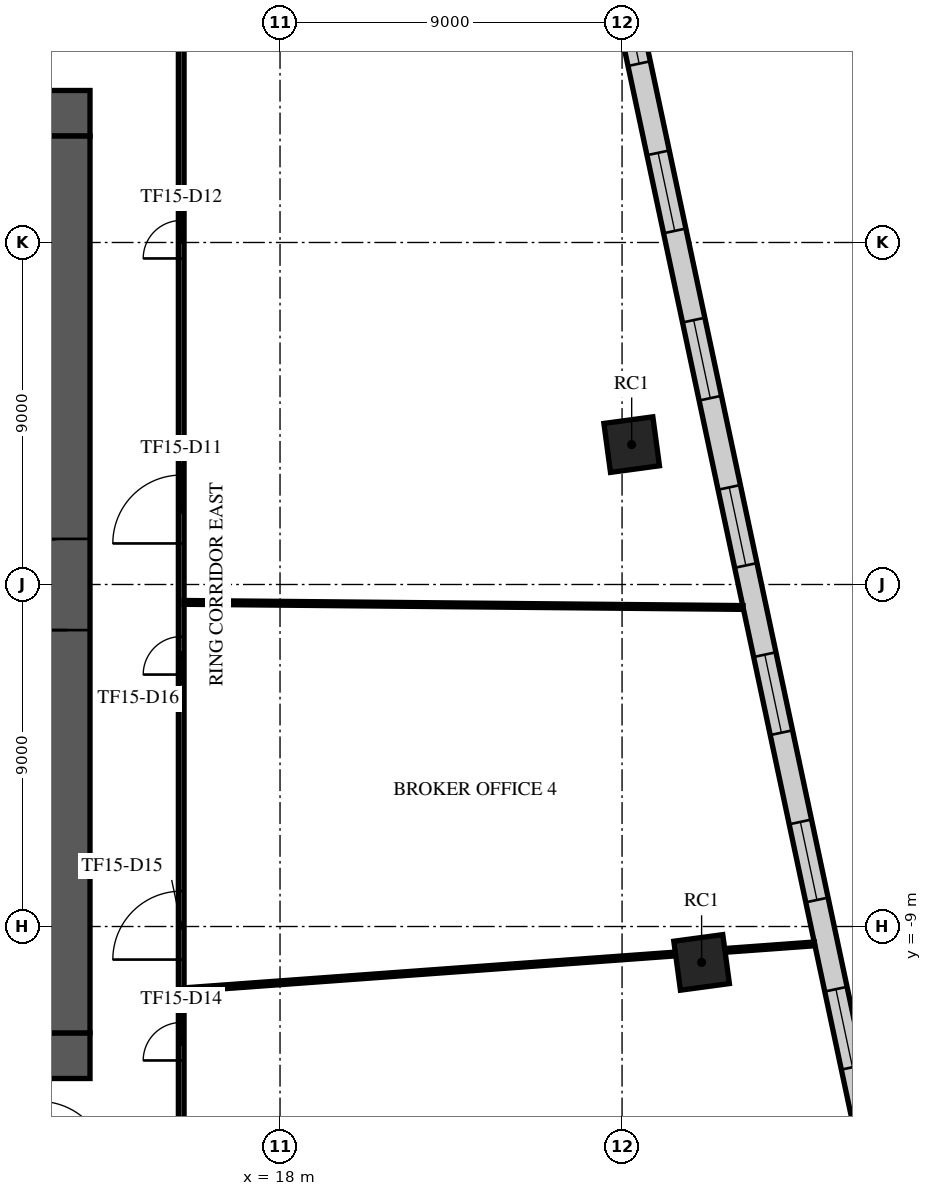
"""IFC4 building model, lengths in metres.
Left out: names, types, materials, properties, quantities, classifications, styles, units other than length and angle.
Written with IfcOpenShell. Run it as: python <this file> out.ifc"""

import sys

from ifc_helpers import new_model, si_unit, direction, frame, frame_2d, origin, origin_2d, place, context, subcontext, project, spatial, rectangle, extrude, element, fill, save


model = new_model("IFC4")
c1 = context("Model", 3, precision=1e-05, world=origin(), true_north=direction((0.0, 1.0)))
c2 = subcontext(c1, "Body", "Model", "MODEL_VIEW")
j1 = project(units=[si_unit("LENGTHUNIT", "METRE"), si_unit("PLANEANGLEUNIT", "RADIAN")], contexts=[c1])
p1 = place(None, origin())
s1 = spatial("IfcSite", under=j1, at=p1, CompositionType="ELEMENT")
p2 = place(p1, origin())
s2 = spatial("IfcBuilding", under=s1, at=p2, CompositionType="ELEMENT")
p3 = place(p2, frame((0.0, 0.0, 68.1)))
s3 = spatial("IfcBuildingStorey", under=s2, at=p3, CompositionType="ELEMENT", Elevation=68.1)
for number, where, z_axis, x_axis in (
    (1, (29.093, -9.945, 0.0), (0.0, 0.0, 1.0), (0.991, 0.134, 0.0)),
    (2, (27.253, 3.681, 0.0), (0.0, 0.0, 1.0), (0.991, 0.134, 0.0)),
):
    element("IfcColumn", number, at=place(p3, frame(where, z_axis=z_axis, x_axis=x_axis)), inside=s3, PredefinedType="COLUMN", context=c2, shape_type="SweptSolid", body=[
        extrude(rectangle(XDim=1.3, YDim=1.3, at=origin_2d()), origin(), (0.0, 0.0, 1.0), 4.2),
    ])
p4 = place(p3, frame((-13.0, 12.4, 0.0), z_axis=(0.0, 0.0, 1.0), x_axis=(1.0, 0.0, 0.0)))
e3 = element("IfcWall", 3, at=p4, inside=s3, PredefinedType="SHEAR", context=c2, shape_type="SweptSolid", body=[
    extrude(rectangle(XDim=26.0, YDim=1.2, at=frame_2d((13.0, 0.0))), origin(), (0.0, 0.0, 1.0), 3.75),
])
p5 = place(p4, frame((11.8, 0.0, 0.0)))
e4 = element("IfcOpeningElement", 4, at=p5, cuts=e3, PredefinedType="OPENING", context=c2, shape_type="SweptSolid", body=[
    extrude(rectangle(XDim=2.4, YDim=2.4, at=frame_2d((1.2, 1.2))), frame((0.0, 0.61, 0.0), z_axis=(0.0, -1.0, 0.0), x_axis=(1.0, 0.0, 0.0)), (0.0, 0.0, 1.0), 1.22),
])
p6 = place(p4, frame((22.625, 0.0, 0.0)))
e5 = element("IfcOpeningElement", 5, at=p6, cuts=e3, PredefinedType="OPENING", context=c2, shape_type="SweptSolid", body=[
    extrude(rectangle(XDim=1.2, YDim=2.1, at=frame_2d((0.6, 1.05))), frame((0.0, 0.61, 0.0), z_axis=(0.0, -1.0, 0.0), x_axis=(1.0, 0.0, 0.0)), (0.0, 0.0, 1.0), 1.22),
])
p7 = place(p4, frame((1.6, 0.0, 0.0)))
e6 = element("IfcOpeningElement", 6, at=p7, cuts=e3, PredefinedType="OPENING", context=c2, shape_type="SweptSolid", body=[
    extrude(rectangle(XDim=1.0, YDim=2.1, at=frame_2d((0.5, 1.05))), frame((0.0, 0.61, 0.0), z_axis=(0.0, -1.0, 0.0), x_axis=(1.0, 0.0, 0.0)), (0.0, 0.0, 1.0), 1.22),
])
p8 = place(p3, frame((-13.0, -12.4, 0.0), z_axis=(0.0, 0.0, 1.0), x_axis=(1.0, 0.0, 0.0)))
e7 = element("IfcWall", 7, at=p8, inside=s3, PredefinedType="SHEAR", context=c2, shape_type="SweptSolid", body=[
    extrude(rectangle(XDim=26.0, YDim=1.2, at=frame_2d((13.0, 0.0))), origin(), (0.0, 0.0, 1.0), 3.75),
])
p9 = place(p8, frame((7.9, 0.0, 0.0)))
e8 = element("IfcOpeningElement", 8, at=p9, cuts=e7, PredefinedType="OPENING", context=c2, shape_type="SweptSolid", body=[
    extrude(rectangle(XDim=2.0, YDim=2.1, at=frame_2d((1.0, 1.05))), frame((0.0, 0.61, 0.0), z_axis=(0.0, -1.0, 0.0), x_axis=(1.0, 0.0, 0.0)), (0.0, 0.0, 1.0), 1.22),
])
p10 = place(p8, frame((18.025, 0.0, 0.0)))
e9 = element("IfcOpeningElement", 9, at=p10, cuts=e7, PredefinedType="OPENING", context=c2, shape_type="SweptSolid", body=[
    extrude(rectangle(XDim=1.2, YDim=2.1, at=frame_2d((0.6, 1.05))), frame((0.0, 0.61, 0.0), z_axis=(0.0, -1.0, 0.0), x_axis=(1.0, 0.0, 0.0)), (0.0, 0.0, 1.0), 1.22),
])
p11 = place(p8, frame((2.175, 0.0, 0.0)))
e10 = element("IfcOpeningElement", 10, at=p11, cuts=e7, PredefinedType="OPENING", context=c2, shape_type="SweptSolid", body=[
    extrude(rectangle(XDim=1.2, YDim=2.1, at=frame_2d((0.6, 1.05))), frame((0.0, 0.61, 0.0), z_axis=(0.0, -1.0, 0.0), x_axis=(1.0, 0.0, 0.0)), (0.0, 0.0, 1.0), 1.22),
])
p12 = place(p8, frame((22.625, 0.0, 0.0)))
e11 = element("IfcOpeningElement", 11, at=p12, cuts=e7, PredefinedType="OPENING", context=c2, shape_type="SweptSolid", body=[
    extrude(rectangle(XDim=1.2, YDim=2.1, at=frame_2d((0.6, 1.05))), frame((0.0, 0.61, 0.0), z_axis=(0.0, -1.0, 0.0), x_axis=(1.0, 0.0, 0.0)), (0.0, 0.0, 1.0), 1.22),
])
p13 = place(p3, frame((12.4, -11.8, 0.0), z_axis=(0.0, 0.0, 1.0), x_axis=(0.0, 1.0, 0.0)))
e12 = element("IfcWall", 12, at=p13, inside=s3, PredefinedType="SHEAR", context=c2, shape_type="SweptSolid", body=[
    extrude(rectangle(XDim=23.6, YDim=1.2, at=frame_2d((11.8, 0.0))), origin(), (0.0, 0.0, 1.0), 3.75),
])
p14 = place(p13, frame((10.6, 0.0, 0.0)))
e13 = element("IfcOpeningElement", 13, at=p14, cuts=e12, PredefinedType="OPENING", context=c2, shape_type="SweptSolid", body=[
    extrude(rectangle(XDim=2.4, YDim=2.4, at=frame_2d((1.2, 1.2))), frame((0.0, 0.61, 0.0), z_axis=(0.0, -1.0, 0.0), x_axis=(1.0, 0.0, 0.0)), (0.0, 0.0, 1.0), 1.22),
])
p15 = place(p3, frame((34.223, -18.157, 0.0), z_axis=(0.0, 0.0, 1.0), x_axis=(-0.207912687805, 0.978147388817, 0.0)))
e14 = element("IfcWall", 14, at=p15, inside=s3, PredefinedType="STANDARD", context=c2, shape_type="SweptSolid", body=[
    extrude(rectangle(XDim=49.376, YDim=0.6, at=frame_2d((24.688, 0.0))), origin(), (0.0, 0.0, 1.0), 3.75),
])
p16 = place(p15, frame((1.138, 0.0, 0.9)))
e15 = element("IfcOpeningElement", 15, at=p16, cuts=e14, PredefinedType="OPENING", context=c2, shape_type="SweptSolid", body=[
    extrude(rectangle(XDim=2.1, YDim=2.1, at=frame_2d((1.05, 1.05))), frame((0.0, 0.31, 0.0), z_axis=(0.0, -1.0, 0.0), x_axis=(1.0, 0.0, 0.0)), (0.0, 0.0, 1.0), 0.62),
])
p17 = place(p15, frame((5.576, 0.0, 0.9)))
e16 = element("IfcOpeningElement", 16, at=p17, cuts=e14, PredefinedType="OPENING", context=c2, shape_type="SweptSolid", body=[
    extrude(rectangle(XDim=2.1, YDim=2.1, at=frame_2d((1.05, 1.05))), frame((0.0, 0.31, 0.0), z_axis=(0.0, -1.0, 0.0), x_axis=(1.0, 0.0, 0.0)), (0.0, 0.0, 1.0), 0.62),
])
p18 = place(p15, frame((10.076, 0.0, 0.9)))
e17 = element("IfcOpeningElement", 17, at=p18, cuts=e14, PredefinedType="OPENING", context=c2, shape_type="SweptSolid", body=[
    extrude(rectangle(XDim=2.1, YDim=2.1, at=frame_2d((1.05, 1.05))), frame((0.0, 0.31, 0.0), z_axis=(0.0, -1.0, 0.0), x_axis=(1.0, 0.0, 0.0)), (0.0, 0.0, 1.0), 0.62),
])
p19 = place(p15, frame((14.576, 0.0, 0.9)))
e18 = element("IfcOpeningElement", 18, at=p19, cuts=e14, PredefinedType="OPENING", context=c2, shape_type="SweptSolid", body=[
    extrude(rectangle(XDim=2.1, YDim=2.1, at=frame_2d((1.05, 1.05))), frame((0.0, 0.31, 0.0), z_axis=(0.0, -1.0, 0.0), x_axis=(1.0, 0.0, 0.0)), (0.0, 0.0, 1.0), 0.62),
])
p20 = place(p15, frame((19.076, 0.0, 0.9)))
e19 = element("IfcOpeningElement", 19, at=p20, cuts=e14, PredefinedType="OPENING", context=c2, shape_type="SweptSolid", body=[
    extrude(rectangle(XDim=2.1, YDim=2.1, at=frame_2d((1.05, 1.05))), frame((0.0, 0.31, 0.0), z_axis=(0.0, -1.0, 0.0), x_axis=(1.0, 0.0, 0.0)), (0.0, 0.0, 1.0), 0.62),
])
p21 = place(p15, frame((23.576, 0.0, 0.9)))
e20 = element("IfcOpeningElement", 20, at=p21, cuts=e14, PredefinedType="OPENING", context=c2, shape_type="SweptSolid", body=[
    extrude(rectangle(XDim=2.1, YDim=2.1, at=frame_2d((1.05, 1.05))), frame((0.0, 0.31, 0.0), z_axis=(0.0, -1.0, 0.0), x_axis=(1.0, 0.0, 0.0)), (0.0, 0.0, 1.0), 0.62),
])
p22 = place(p15, frame((28.076, 0.0, 0.9)))
e21 = element("IfcOpeningElement", 21, at=p22, cuts=e14, PredefinedType="OPENING", context=c2, shape_type="SweptSolid", body=[
    extrude(rectangle(XDim=2.1, YDim=2.1, at=frame_2d((1.05, 1.05))), frame((0.0, 0.31, 0.0), z_axis=(0.0, -1.0, 0.0), x_axis=(1.0, 0.0, 0.0)), (0.0, 0.0, 1.0), 0.62),
])
p23 = place(p15, frame((32.576, 0.0, 0.9)))
e22 = element("IfcOpeningElement", 22, at=p23, cuts=e14, PredefinedType="OPENING", context=c2, shape_type="SweptSolid", body=[
    extrude(rectangle(XDim=2.1, YDim=2.1, at=frame_2d((1.05, 1.05))), frame((0.0, 0.31, 0.0), z_axis=(0.0, -1.0, 0.0), x_axis=(1.0, 0.0, 0.0)), (0.0, 0.0, 1.0), 0.62),
])
p24 = place(p15, frame((41.576, 0.0, 0.9)))
e23 = element("IfcOpeningElement", 23, at=p24, cuts=e14, PredefinedType="OPENING", context=c2, shape_type="SweptSolid", body=[
    extrude(rectangle(XDim=2.1, YDim=2.1, at=frame_2d((1.05, 1.05))), frame((0.0, 0.31, 0.0), z_axis=(0.0, -1.0, 0.0), x_axis=(1.0, 0.0, 0.0)), (0.0, 0.0, 1.0), 0.62),
])
p25 = place(p15, frame((46.076, 0.0, 0.9)))
e24 = element("IfcOpeningElement", 24, at=p25, cuts=e14, PredefinedType="OPENING", context=c2, shape_type="SweptSolid", body=[
    extrude(rectangle(XDim=2.1, YDim=2.1, at=frame_2d((1.05, 1.05))), frame((0.0, 0.31, 0.0), z_axis=(0.0, -1.0, 0.0), x_axis=(1.0, 0.0, 0.0)), (0.0, 0.0, 1.0), 0.62),
])
p26 = place(p3, frame((15.4, -15.325, 0.0), z_axis=(0.0, 0.0, 1.0), x_axis=(0.0, 1.0, 0.0)))
e25 = element("IfcWall", 25, at=p26, inside=s3, PredefinedType="PARTITIONING", context=c2, shape_type="SweptSolid", body=[
    extrude(rectangle(XDim=30.65, YDim=0.15, at=frame_2d((15.325, 0.0))), origin(), (0.0, 0.0, 1.0), 3.25),
])
p27 = place(p26, frame((16.405, 0.0, 0.0)))
e26 = element("IfcOpeningElement", 26, at=p27, cuts=e25, PredefinedType="OPENING", context=c2, shape_type="SweptSolid", body=[
    extrude(rectangle(XDim=1.8, YDim=2.1, at=frame_2d((0.9, 1.05))), frame((0.0, 0.085, 0.0), z_axis=(0.0, -1.0, 0.0), x_axis=(1.0, 0.0, 0.0)), (0.0, 0.0, 1.0), 0.17),
])
p28 = place(p26, frame((23.905, 0.0, 0.0)))
e27 = element("IfcOpeningElement", 27, at=p28, cuts=e25, PredefinedType="OPENING", context=c2, shape_type="SweptSolid", body=[
    extrude(rectangle(XDim=1.0, YDim=2.1, at=frame_2d((0.5, 1.05))), frame((0.0, 0.085, 0.0), z_axis=(0.0, -1.0, 0.0), x_axis=(1.0, 0.0, 0.0)), (0.0, 0.0, 1.0), 0.17),
])
p29 = place(p26, frame((2.8, 0.0, 0.0)))
e28 = element("IfcOpeningElement", 28, at=p29, cuts=e25, PredefinedType="OPENING", context=c2, shape_type="SweptSolid", body=[
    extrude(rectangle(XDim=1.0, YDim=2.1, at=frame_2d((0.5, 1.05))), frame((0.0, 0.085, 0.0), z_axis=(0.0, -1.0, 0.0), x_axis=(1.0, 0.0, 0.0)), (0.0, 0.0, 1.0), 0.17),
])
p30 = place(p26, frame((5.455, 0.0, 0.0)))
e29 = element("IfcOpeningElement", 29, at=p30, cuts=e25, PredefinedType="OPENING", context=c2, shape_type="SweptSolid", body=[
    extrude(rectangle(XDim=1.8, YDim=2.1, at=frame_2d((0.9, 1.05))), frame((0.0, 0.085, 0.0), z_axis=(0.0, -1.0, 0.0), x_axis=(1.0, 0.0, 0.0)), (0.0, 0.0, 1.0), 0.17),
])
p31 = place(p26, frame((12.955, 0.0, 0.0)))
e30 = element("IfcOpeningElement", 30, at=p31, cuts=e25, PredefinedType="OPENING", context=c2, shape_type="SweptSolid", body=[
    extrude(rectangle(XDim=1.0, YDim=2.1, at=frame_2d((0.5, 1.05))), frame((0.0, 0.085, 0.0), z_axis=(0.0, -1.0, 0.0), x_axis=(1.0, 0.0, 0.0)), (0.0, 0.0, 1.0), 0.17),
])
p32 = place(p3, frame((15.479, -10.664, 0.0), z_axis=(0.0, 0.0, 1.0), x_axis=(0.997362198838, 0.072585427795, 0.0)))
e31 = element("IfcWall", 31, at=p32, inside=s3, PredefinedType="PARTITIONING", context=c2, shape_type="SweptSolid", body=[
    extrude(rectangle(XDim=12.963, YDim=0.1, at=frame_2d((6.481, 0.0))), origin(), (0.0, 0.0, 1.0), 3.25),
])
p33 = place(p3, frame((15.476, -0.471, 0.0), z_axis=(0.0, 0.0, 1.0), x_axis=(0.999958628106, -0.009096267192, 0.0)))
e32 = element("IfcWall", 32, at=p33, inside=s3, PredefinedType="PARTITIONING", context=c2, shape_type="SweptSolid", body=[
    extrude(rectangle(XDim=14.708, YDim=0.1, at=frame_2d((7.354, 0.0))), origin(), (0.0, 0.0, 1.0), 2.95),
])
p34 = place(p3, frame((29.706, -9.629, 0.0), z_axis=(0.0, 0.0, 1.0), x_axis=(0.997355486737, 0.072677596798, 0.0)))
e33 = element("IfcWall", 33, at=p34, inside=s3, PredefinedType="PARTITIONING", context=c2, shape_type="SweptSolid", body=[
    extrude(rectangle(XDim=2.365, YDim=0.1, at=frame_2d((1.183, 0.0))), origin(), (0.0, 0.0, 1.0), 3.75),
])
p35 = place(p14, origin())
e34 = element("IfcDoor", 34, at=p35, inside=s3, OperationType="SINGLE_SWING_LEFT", PredefinedType="DOOR", context=c2, shape_type="SweptSolid", body=[
    extrude(rectangle(XDim=2.4, YDim=2.4, at=frame_2d((1.2, 1.2))), frame((0.0, 0.025, 0.0), z_axis=(0.0, -1.0, 0.0), x_axis=(1.0, 0.0, 0.0)), (0.0, 0.0, 1.0), 0.05),
])
fill(e13, e34)
p36 = place(p17, origin())
e35 = element("IfcWindow", 35, at=p36, inside=s3, PartitioningType="SINGLE_PANEL", PredefinedType="WINDOW", context=c2, shape_type="SweptSolid", body=[
    extrude(rectangle(XDim=2.1, YDim=2.1, at=frame_2d((1.05, 1.05))), frame((0.0, 0.03, 0.0), z_axis=(0.0, -1.0, 0.0), x_axis=(1.0, 0.0, 0.0)), (0.0, 0.0, 1.0), 0.06),
])
fill(e16, e35)
p37 = place(p18, origin())
e36 = element("IfcWindow", 36, at=p37, inside=s3, PartitioningType="SINGLE_PANEL", PredefinedType="WINDOW", context=c2, shape_type="SweptSolid", body=[
    extrude(rectangle(XDim=2.1, YDim=2.1, at=frame_2d((1.05, 1.05))), frame((0.0, 0.03, 0.0), z_axis=(0.0, -1.0, 0.0), x_axis=(1.0, 0.0, 0.0)), (0.0, 0.0, 1.0), 0.06),
])
fill(e17, e36)
p38 = place(p19, origin())
e37 = element("IfcWindow", 37, at=p38, inside=s3, PartitioningType="SINGLE_PANEL", PredefinedType="WINDOW", context=c2, shape_type="SweptSolid", body=[
    extrude(rectangle(XDim=2.1, YDim=2.1, at=frame_2d((1.05, 1.05))), frame((0.0, 0.03, 0.0), z_axis=(0.0, -1.0, 0.0), x_axis=(1.0, 0.0, 0.0)), (0.0, 0.0, 1.0), 0.06),
])
fill(e18, e37)
p39 = place(p20, origin())
e38 = element("IfcWindow", 38, at=p39, inside=s3, PartitioningType="SINGLE_PANEL", PredefinedType="WINDOW", context=c2, shape_type="SweptSolid", body=[
    extrude(rectangle(XDim=2.1, YDim=2.1, at=frame_2d((1.05, 1.05))), frame((0.0, 0.03, 0.0), z_axis=(0.0, -1.0, 0.0), x_axis=(1.0, 0.0, 0.0)), (0.0, 0.0, 1.0), 0.06),
])
fill(e19, e38)
p40 = place(p21, origin())
e39 = element("IfcWindow", 39, at=p40, inside=s3, PartitioningType="SINGLE_PANEL", PredefinedType="WINDOW", context=c2, shape_type="SweptSolid", body=[
    extrude(rectangle(XDim=2.1, YDim=2.1, at=frame_2d((1.05, 1.05))), frame((0.0, 0.03, 0.0), z_axis=(0.0, -1.0, 0.0), x_axis=(1.0, 0.0, 0.0)), (0.0, 0.0, 1.0), 0.06),
])
fill(e20, e39)
p41 = place(p22, origin())
e40 = element("IfcWindow", 40, at=p41, inside=s3, PartitioningType="SINGLE_PANEL", PredefinedType="WINDOW", context=c2, shape_type="SweptSolid", body=[
    extrude(rectangle(XDim=2.1, YDim=2.1, at=frame_2d((1.05, 1.05))), frame((0.0, 0.03, 0.0), z_axis=(0.0, -1.0, 0.0), x_axis=(1.0, 0.0, 0.0)), (0.0, 0.0, 1.0), 0.06),
])
fill(e21, e40)
p42 = place(p23, origin())
e41 = element("IfcWindow", 41, at=p42, inside=s3, PartitioningType="SINGLE_PANEL", PredefinedType="WINDOW", context=c2, shape_type="SweptSolid", body=[
    extrude(rectangle(XDim=2.1, YDim=2.1, at=frame_2d((1.05, 1.05))), frame((0.0, 0.03, 0.0), z_axis=(0.0, -1.0, 0.0), x_axis=(1.0, 0.0, 0.0)), (0.0, 0.0, 1.0), 0.06),
])
fill(e22, e41)
p43 = place(p27, frame((1.8, 0.0, 0.0), z_axis=(0.0, 0.0, 1.0), x_axis=(-1.0, 0.0, 0.0)))
e42 = element("IfcDoor", 42, at=p43, inside=s3, OperationType="DOUBLE_DOOR_SINGLE_SWING", PredefinedType="DOOR", context=c2, shape_type="SweptSolid", body=[
    extrude(rectangle(XDim=1.8, YDim=2.1, at=frame_2d((0.9, 1.05))), frame((0.0, 0.025, 0.0), z_axis=(0.0, -1.0, 0.0), x_axis=(1.0, 0.0, 0.0)), (0.0, 0.0, 1.0), 0.05),
])
fill(e26, e42)
p44 = place(p28, frame((1.0, 0.0, 0.0), z_axis=(0.0, 0.0, 1.0), x_axis=(-1.0, 0.0, 0.0)))
e43 = element("IfcDoor", 43, at=p44, inside=s3, OperationType="SINGLE_SWING_RIGHT", PredefinedType="DOOR", context=c2, shape_type="SweptSolid", body=[
    extrude(rectangle(XDim=1.0, YDim=2.1, at=frame_2d((0.5, 1.05))), frame((0.0, 0.025, 0.0), z_axis=(0.0, -1.0, 0.0), x_axis=(1.0, 0.0, 0.0)), (0.0, 0.0, 1.0), 0.05),
])
fill(e27, e43)
p45 = place(p29, frame((1.0, 0.0, 0.0), z_axis=(0.0, 0.0, 1.0), x_axis=(-1.0, 0.0, 0.0)))
e44 = element("IfcDoor", 44, at=p45, inside=s3, OperationType="SINGLE_SWING_LEFT", PredefinedType="DOOR", context=c2, shape_type="SweptSolid", body=[
    extrude(rectangle(XDim=1.0, YDim=2.1, at=frame_2d((0.5, 1.05))), frame((0.0, 0.025, 0.0), z_axis=(0.0, -1.0, 0.0), x_axis=(1.0, 0.0, 0.0)), (0.0, 0.0, 1.0), 0.05),
])
fill(e28, e44)
p46 = place(p30, frame((1.8, 0.0, 0.0), z_axis=(0.0, 0.0, 1.0), x_axis=(-1.0, 0.0, 0.0)))
e45 = element("IfcDoor", 45, at=p46, inside=s3, OperationType="DOUBLE_DOOR_SINGLE_SWING", PredefinedType="DOOR", context=c2, shape_type="SweptSolid", body=[
    extrude(rectangle(XDim=1.8, YDim=2.1, at=frame_2d((0.9, 1.05))), frame((0.0, 0.025, 0.0), z_axis=(0.0, -1.0, 0.0), x_axis=(1.0, 0.0, 0.0)), (0.0, 0.0, 1.0), 0.05),
])
fill(e29, e45)
p47 = place(p31, frame((1.0, 0.0, 0.0), z_axis=(0.0, 0.0, 1.0), x_axis=(-1.0, 0.0, 0.0)))
e46 = element("IfcDoor", 46, at=p47, inside=s3, OperationType="SINGLE_SWING_LEFT", PredefinedType="DOOR", context=c2, shape_type="SweptSolid", body=[
    extrude(rectangle(XDim=1.0, YDim=2.1, at=frame_2d((0.5, 1.05))), frame((0.0, 0.025, 0.0), z_axis=(0.0, -1.0, 0.0), x_axis=(1.0, 0.0, 0.0)), (0.0, 0.0, 1.0), 0.05),
])
fill(e30, e46)
save(model, sys.argv[1])
